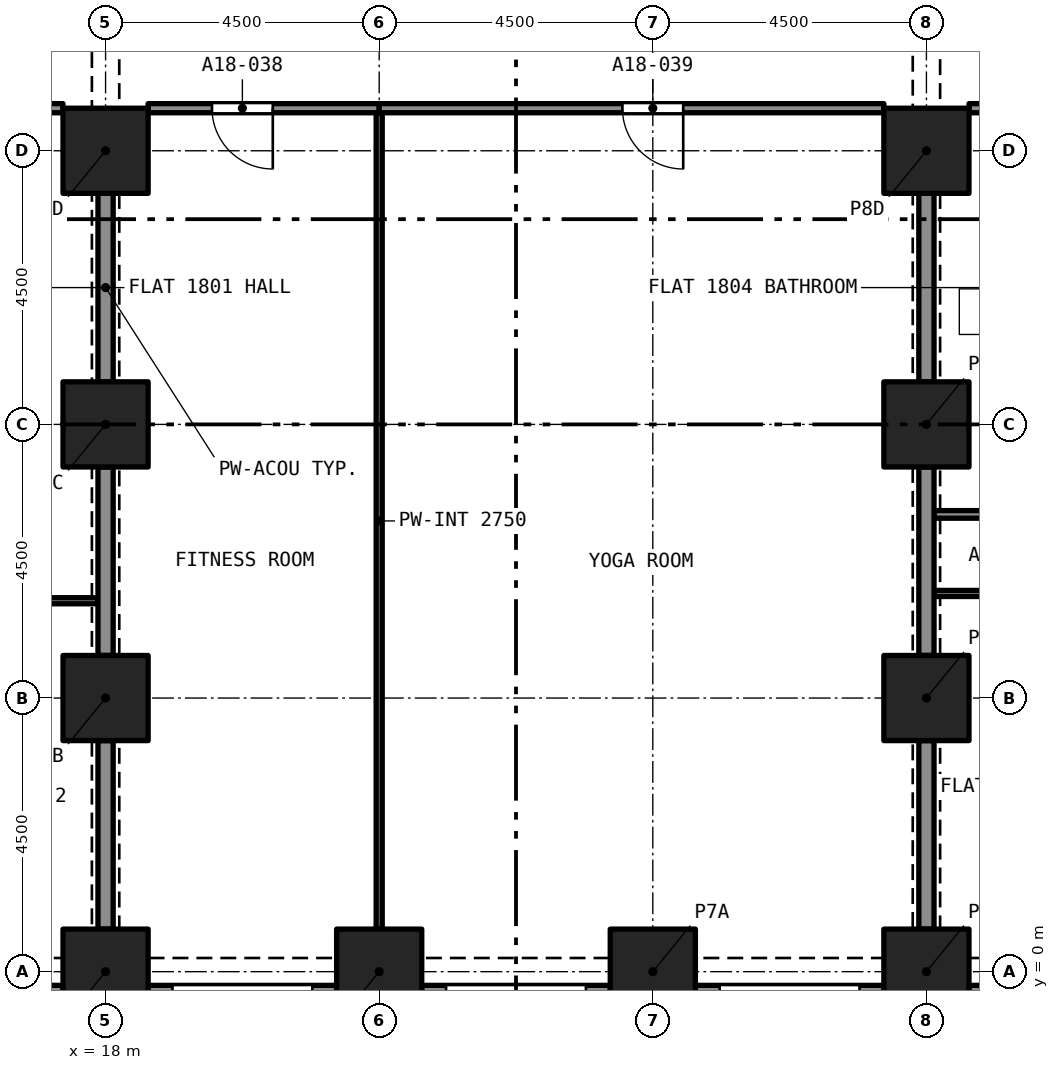
"""IFC4 building model, lengths in metres.
Left out: names, types, materials, properties, quantities, classifications, styles, units other than length and angle.
Written with IfcOpenShell. Run it as: python <this file> out.ifc"""

import sys

from ifc_helpers import new_model, si_unit, direction, frame, frame_2d, origin, origin_2d, place, context, subcontext, project, spatial, rectangle, extrude, element, fill, save


model = new_model("IFC4")
c1 = context("Model", 3, precision=1e-05, world=origin(), true_north=direction((0.0, 1.0)))
c2 = subcontext(c1, "Body", "Model", "MODEL_VIEW")
j1 = project(units=[si_unit("LENGTHUNIT", "METRE"), si_unit("PLANEANGLEUNIT", "RADIAN")], contexts=[c1])
p1 = place(None, origin())
s1 = spatial("IfcSite", under=j1, at=p1, CompositionType="ELEMENT")
p2 = place(p1, origin())
s2 = spatial("IfcBuilding", under=s1, at=p2, CompositionType="ELEMENT")
p3 = place(p2, frame((0.0, 0.0, 68.8)))
s3 = spatial("IfcBuildingStorey", under=s2, at=p3, CompositionType="ELEMENT", Elevation=68.8)
for number, where, z_axis, x_axis in (
    (1, (18.0, 0.0, 0.0), (0.0, 0.0, 1.0), (1.0, 0.0, 0.0)),
    (2, (22.5, 0.0, 0.0), (0.0, 0.0, 1.0), (1.0, 0.0, 0.0)),
    (3, (27.0, 0.0, 0.0), (0.0, 0.0, 1.0), (1.0, 0.0, 0.0)),
    (4, (31.5, 0.0, 0.0), (0.0, 0.0, 1.0), (1.0, 0.0, 0.0)),
    (5, (18.0, 4.5, 0.0), (0.0, 0.0, 1.0), (1.0, 0.0, 0.0)),
    (6, (31.5, 4.5, 0.0), (0.0, 0.0, 1.0), (1.0, 0.0, 0.0)),
    (7, (18.0, 9.0, 0.0), (0.0, 0.0, 1.0), (1.0, 0.0, 0.0)),
    (8, (31.5, 9.0, 0.0), (0.0, 0.0, 1.0), (1.0, 0.0, 0.0)),
    (9, (18.0, 13.5, 0.0), (0.0, 0.0, 1.0), (1.0, 0.0, 0.0)),
    (10, (31.5, 13.5, 0.0), (0.0, 0.0, 1.0), (1.0, 0.0, 0.0)),
):
    element("IfcColumn", number, at=place(p3, frame(where, z_axis=z_axis, x_axis=x_axis)), inside=s3, PredefinedType="COLUMN", context=c2, shape_type="SweptSolid", body=[
        extrude(rectangle(XDim=1.4, YDim=1.4, at=origin_2d()), origin(), (0.0, 0.0, 1.0), 3.2),
    ])
p4 = place(p3, frame((17.3, -0.375, 0.0), z_axis=(0.0, 0.0, 1.0), x_axis=(-1.0, 0.0, 0.0)))
e11 = element("IfcWall", 11, at=p4, inside=s3, PredefinedType="SOLIDWALL", context=c2, shape_type="SweptSolid", body=[
    extrude(rectangle(XDim=3.1, YDim=0.3, at=frame_2d((1.55, 0.0))), origin(), (0.0, 0.0, 1.0), 3.2),
])
p5 = place(p4, frame((0.4, 0.0, 0.45)))
e12 = element("IfcOpeningElement", 12, at=p5, cuts=e11, PredefinedType="OPENING", context=c2, shape_type="SweptSolid", body=[
    extrude(rectangle(XDim=2.3, YDim=1.95, at=frame_2d((1.15, 0.975))), frame((0.0, 0.16, 0.0), z_axis=(0.0, -1.0, 0.0), x_axis=(1.0, 0.0, 0.0)), (0.0, 0.0, 1.0), 0.32),
])
p6 = place(p3, frame((21.8, -0.375, 0.0), z_axis=(0.0, 0.0, 1.0), x_axis=(-1.0, 0.0, 0.0)))
e13 = element("IfcWall", 13, at=p6, inside=s3, PredefinedType="SOLIDWALL", context=c2, shape_type="SweptSolid", body=[
    extrude(rectangle(XDim=3.1, YDim=0.3, at=frame_2d((1.55, 0.0))), origin(), (0.0, 0.0, 1.0), 3.2),
])
p7 = place(p6, frame((0.4, 0.0, 0.45)))
e14 = element("IfcOpeningElement", 14, at=p7, cuts=e13, PredefinedType="OPENING", context=c2, shape_type="SweptSolid", body=[
    extrude(rectangle(XDim=2.3, YDim=1.95, at=frame_2d((1.15, 0.975))), frame((0.0, 0.16, 0.0), z_axis=(0.0, -1.0, 0.0), x_axis=(1.0, 0.0, 0.0)), (0.0, 0.0, 1.0), 0.32),
])
p8 = place(p3, frame((26.3, -0.375, 0.0), z_axis=(0.0, 0.0, 1.0), x_axis=(-1.0, 0.0, 0.0)))
e15 = element("IfcWall", 15, at=p8, inside=s3, PredefinedType="SOLIDWALL", context=c2, shape_type="SweptSolid", body=[
    extrude(rectangle(XDim=3.1, YDim=0.3, at=frame_2d((1.55, 0.0))), origin(), (0.0, 0.0, 1.0), 3.2),
])
p9 = place(p8, frame((0.4, 0.0, 0.45)))
e16 = element("IfcOpeningElement", 16, at=p9, cuts=e15, PredefinedType="OPENING", context=c2, shape_type="SweptSolid", body=[
    extrude(rectangle(XDim=2.3, YDim=1.95, at=frame_2d((1.15, 0.975))), frame((0.0, 0.16, 0.0), z_axis=(0.0, -1.0, 0.0), x_axis=(1.0, 0.0, 0.0)), (0.0, 0.0, 1.0), 0.32),
])
p10 = place(p3, frame((30.8, -0.375, 0.0), z_axis=(0.0, 0.0, 1.0), x_axis=(-1.0, 0.0, 0.0)))
e17 = element("IfcWall", 17, at=p10, inside=s3, PredefinedType="SOLIDWALL", context=c2, shape_type="SweptSolid", body=[
    extrude(rectangle(XDim=3.1, YDim=0.3, at=frame_2d((1.55, 0.0))), origin(), (0.0, 0.0, 1.0), 3.2),
])
p11 = place(p10, frame((0.4, 0.0, 0.45)))
e18 = element("IfcOpeningElement", 18, at=p11, cuts=e17, PredefinedType="OPENING", context=c2, shape_type="SweptSolid", body=[
    extrude(rectangle(XDim=2.3, YDim=1.95, at=frame_2d((1.15, 0.975))), frame((0.0, 0.16, 0.0), z_axis=(0.0, -1.0, 0.0), x_axis=(1.0, 0.0, 0.0)), (0.0, 0.0, 1.0), 0.32),
])
p12 = place(p3, frame((35.3, -0.375, 0.0), z_axis=(0.0, 0.0, 1.0), x_axis=(-1.0, 0.0, 0.0)))
e19 = element("IfcWall", 19, at=p12, inside=s3, PredefinedType="SOLIDWALL", context=c2, shape_type="SweptSolid", body=[
    extrude(rectangle(XDim=3.1, YDim=0.3, at=frame_2d((1.55, 0.0))), origin(), (0.0, 0.0, 1.0), 3.2),
])
p13 = place(p12, frame((0.4, 0.0, 0.45)))
e20 = element("IfcOpeningElement", 20, at=p13, cuts=e19, PredefinedType="OPENING", context=c2, shape_type="SweptSolid", body=[
    extrude(rectangle(XDim=2.3, YDim=1.95, at=frame_2d((1.15, 0.975))), frame((0.0, 0.16, 0.0), z_axis=(0.0, -1.0, 0.0), x_axis=(1.0, 0.0, 0.0)), (0.0, 0.0, 1.0), 0.32),
])
p14 = place(p3, frame((17.875, 6.1, 0.0), z_axis=(0.0, 0.0, 1.0), x_axis=(-1.0, 0.0, 0.0)))
e21 = element("IfcWall", 21, at=p14, inside=s3, PredefinedType="PARTITIONING", context=c2, shape_type="SweptSolid", body=[
    extrude(rectangle(XDim=4.375, YDim=0.1, at=frame_2d((2.188, 0.0))), origin(), (0.0, 0.0, 1.0), 2.9),
])
p15 = place(p14, frame((1.675, 0.0, 0.0)))
e22 = element("IfcOpeningElement", 22, at=p15, cuts=e21, PredefinedType="OPENING", context=c2, shape_type="SweptSolid", body=[
    extrude(rectangle(XDim=0.9, YDim=2.1, at=frame_2d((0.45, 1.05))), frame((0.0, 0.06, 0.0), z_axis=(0.0, -1.0, 0.0), x_axis=(1.0, 0.0, 0.0)), (0.0, 0.0, 1.0), 0.12),
])
for number, where, z_axis, x_axis in (
    (23, (18.0, 5.2, 0.0), (0.0, 0.0, 1.0), (0.0, 1.0, 0.0)),
    (24, (18.0, 0.7, 0.0), (0.0, 0.0, 1.0), (0.0, 1.0, 0.0)),
    (25, (18.0, 9.7, 0.0), (0.0, 0.0, 1.0), (0.0, 1.0, 0.0)),
):
    element("IfcWall", number, at=place(p3, frame(where, z_axis=z_axis, x_axis=x_axis)), inside=s3, PredefinedType="PARTITIONING", context=c2, shape_type="SweptSolid", body=[
        extrude(rectangle(XDim=3.1, YDim=0.25, at=frame_2d((1.55, 0.0))), origin(), (0.0, 0.0, 1.0), 2.38),
    ])
p16 = place(p3, frame((17.3, 14.2, 0.0), z_axis=(0.0, 0.0, 1.0), x_axis=(-1.0, 0.0, 0.0)))
e26 = element("IfcWall", 26, at=p16, inside=s3, PredefinedType="PARTITIONING", context=c2, shape_type="SweptSolid", body=[
    extrude(rectangle(XDim=2.3, YDim=0.15, at=frame_2d((1.15, 0.0))), origin(), (0.0, 0.0, 1.0), 2.9),
])
p17 = place(p16, frame((1.05, 0.0, 0.0)))
e27 = element("IfcOpeningElement", 27, at=p17, cuts=e26, PredefinedType="OPENING", context=c2, shape_type="SweptSolid", body=[
    extrude(rectangle(XDim=1.0, YDim=2.1, at=frame_2d((0.5, 1.05))), frame((0.0, 0.085, 0.0), z_axis=(0.0, -1.0, 0.0), x_axis=(1.0, 0.0, 0.0)), (0.0, 0.0, 1.0), 0.17),
])
p18 = place(p3, frame((31.625, 7.52, 0.0), z_axis=(0.0, 0.0, 1.0), x_axis=(1.0, 0.0, 0.0)))
e28 = element("IfcWall", 28, at=p18, inside=s3, PredefinedType="PARTITIONING", context=c2, shape_type="SweptSolid", body=[
    extrude(rectangle(XDim=2.594, YDim=0.125, at=frame_2d((1.297, 0.0))), origin(), (0.0, 0.0, 1.0), 2.9),
])
p19 = place(p18, frame((0.835, 0.0, 0.0)))
e29 = element("IfcOpeningElement", 29, at=p19, cuts=e28, PredefinedType="OPENING", context=c2, shape_type="SweptSolid", body=[
    extrude(rectangle(XDim=0.8, YDim=2.1, at=frame_2d((0.4, 1.05))), frame((0.0, 0.073, 0.0), z_axis=(0.0, -1.0, 0.0), x_axis=(1.0, 0.0, 0.0)), (0.0, 0.0, 1.0), 0.145),
])
p20 = place(p3, frame((31.5, 9.7, 0.0), z_axis=(0.0, 0.0, 1.0), x_axis=(0.0, 1.0, 0.0)))
e30 = element("IfcWall", 30, at=p20, inside=s3, PredefinedType="PARTITIONING", context=c2, shape_type="SweptSolid", body=[
    extrude(rectangle(XDim=3.1, YDim=0.25, at=frame_2d((1.55, 0.0))), origin(), (0.0, 0.0, 1.0), 2.38),
])
p21 = place(p3, frame((32.2, 14.2, 0.0), z_axis=(0.0, 0.0, 1.0), x_axis=(1.0, 0.0, 0.0)))
e31 = element("IfcWall", 31, at=p21, inside=s3, PredefinedType="PARTITIONING", context=c2, shape_type="SweptSolid", body=[
    extrude(rectangle(XDim=5.3, YDim=0.15, at=frame_2d((2.65, 0.0))), origin(), (0.0, 0.0, 1.0), 2.9),
])
p22 = place(p3, frame((36.0, 6.22, 0.0), z_axis=(0.0, 0.0, 1.0), x_axis=(-1.0, 0.0, 0.0)))
e32 = element("IfcWall", 32, at=p22, inside=s3, PredefinedType="PARTITIONING", context=c2, shape_type="SweptSolid", body=[
    extrude(rectangle(XDim=4.375, YDim=0.1, at=frame_2d((2.188, 0.0))), origin(), (0.0, 0.0, 1.0), 2.9),
])
p23 = place(p22, frame((1.75, 0.0, 0.0)))
e33 = element("IfcOpeningElement", 33, at=p23, cuts=e32, PredefinedType="OPENING", context=c2, shape_type="SweptSolid", body=[
    extrude(rectangle(XDim=1.0, YDim=2.1, at=frame_2d((0.5, 1.05))), frame((0.0, 0.06, 0.0), z_axis=(0.0, -1.0, 0.0), x_axis=(1.0, 0.0, 0.0)), (0.0, 0.0, 1.0), 0.12),
])
for number, where, z_axis, x_axis in (
    (34, (31.5, 0.7, 0.0), (0.0, 0.0, 1.0), (0.0, 1.0, 0.0)),
    (35, (31.5, 5.2, 0.0), (0.0, 0.0, 1.0), (0.0, 1.0, 0.0)),
):
    element("IfcWall", number, at=place(p3, frame(where, z_axis=z_axis, x_axis=x_axis)), inside=s3, PredefinedType="PARTITIONING", context=c2, shape_type="SweptSolid", body=[
        extrude(rectangle(XDim=3.1, YDim=0.25, at=frame_2d((1.55, 0.0))), origin(), (0.0, 0.0, 1.0), 2.38),
    ])
p24 = place(p3, frame((22.5, 0.7, 0.0), z_axis=(0.0, 0.0, 1.0), x_axis=(0.0, 1.0, 0.0)))
e36 = element("IfcWall", 36, at=p24, inside=s3, PredefinedType="PARTITIONING", context=c2, shape_type="SweptSolid", body=[
    extrude(rectangle(XDim=13.425, YDim=0.1, at=frame_2d((6.712, 0.0))), origin(), (0.0, 0.0, 1.0), 2.75),
])
p25 = place(p3, frame((22.5, 14.2, 0.0), z_axis=(0.0, 0.0, 1.0), x_axis=(-1.0, 0.0, 0.0)))
e37 = element("IfcWall", 37, at=p25, inside=s3, PredefinedType="PARTITIONING", context=c2, shape_type="SweptSolid", body=[
    extrude(rectangle(XDim=3.8, YDim=0.15, at=frame_2d((1.9, 0.0))), origin(), (0.0, 0.0, 1.0), 2.75),
])
p26 = place(p25, frame((1.75, 0.0, 0.0)))
e38 = element("IfcOpeningElement", 38, at=p26, cuts=e37, PredefinedType="OPENING", context=c2, shape_type="SweptSolid", body=[
    extrude(rectangle(XDim=1.0, YDim=2.1, at=frame_2d((0.5, 1.05))), frame((0.0, 0.085, 0.0), z_axis=(0.0, -1.0, 0.0), x_axis=(1.0, 0.0, 0.0)), (0.0, 0.0, 1.0), 0.17),
])
p27 = place(p3, frame((30.8, 14.2, 0.0), z_axis=(0.0, 0.0, 1.0), x_axis=(-1.0, 0.0, 0.0)))
e39 = element("IfcWall", 39, at=p27, inside=s3, PredefinedType="PARTITIONING", context=c2, shape_type="SweptSolid", body=[
    extrude(rectangle(XDim=8.3, YDim=0.15, at=frame_2d((4.15, 0.0))), origin(), (0.0, 0.0, 1.0), 2.75),
])
p28 = place(p27, frame((3.3, 0.0, 0.0)))
e40 = element("IfcOpeningElement", 40, at=p28, cuts=e39, PredefinedType="OPENING", context=c2, shape_type="SweptSolid", body=[
    extrude(rectangle(XDim=1.0, YDim=2.1, at=frame_2d((0.5, 1.05))), frame((0.0, 0.085, 0.0), z_axis=(0.0, -1.0, 0.0), x_axis=(1.0, 0.0, 0.0)), (0.0, 0.0, 1.0), 0.17),
])
p29 = place(p26, origin())
e41 = element("IfcDoor", 41, at=p29, inside=s3, OperationType="SINGLE_SWING_RIGHT", PredefinedType="DOOR", context=c2, shape_type="SweptSolid", body=[
    extrude(rectangle(XDim=1.0, YDim=2.1, at=frame_2d((0.5, 1.05))), frame((0.0, 0.025, 0.0), z_axis=(0.0, -1.0, 0.0), x_axis=(1.0, 0.0, 0.0)), (0.0, 0.0, 1.0), 0.05),
])
fill(e38, e41)
p30 = place(p28, origin())
e42 = element("IfcDoor", 42, at=p30, inside=s3, OperationType="SINGLE_SWING_LEFT", PredefinedType="DOOR", context=c2, shape_type="SweptSolid", body=[
    extrude(rectangle(XDim=1.0, YDim=2.1, at=frame_2d((0.5, 1.05))), frame((0.0, 0.025, 0.0), z_axis=(0.0, -1.0, 0.0), x_axis=(1.0, 0.0, 0.0)), (0.0, 0.0, 1.0), 0.05),
])
fill(e40, e42)
save(model, sys.argv[1])
